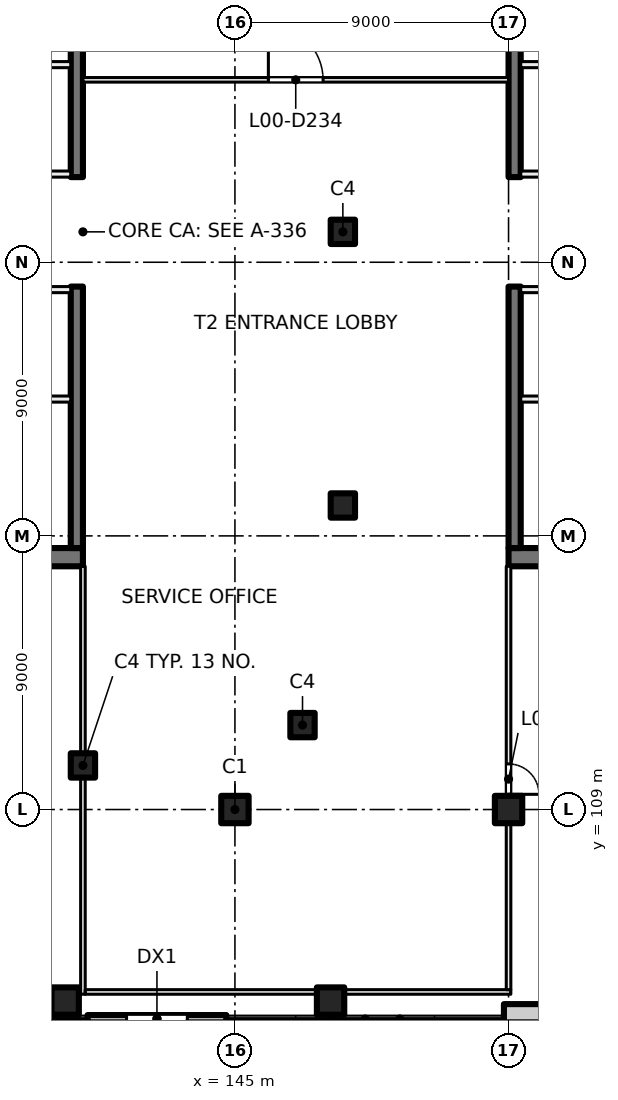
"""IFC4 building model, lengths in metres.
Left out: names, types, materials, properties, quantities, classifications, styles, units other than length and angle.
Written with IfcOpenShell. Run it as: python <this file> out.ifc"""

import sys

from ifc_helpers import new_model, si_unit, direction, frame, frame_2d, origin, origin_2d, place, context, subcontext, project, spatial, rectangle, extrude, element, fill, save


model = new_model("IFC4")
c1 = context("Model", 3, precision=1e-05, world=origin(), true_north=direction((0.0, 1.0)))
c2 = subcontext(c1, "Body", "Model", "MODEL_VIEW")
j1 = project(units=[si_unit("LENGTHUNIT", "METRE"), si_unit("PLANEANGLEUNIT", "RADIAN")], contexts=[c1])
p1 = place(None, origin())
s1 = spatial("IfcSite", under=j1, at=p1, CompositionType="ELEMENT")
p2 = place(p1, origin())
s2 = spatial("IfcBuilding", under=s1, at=p2, CompositionType="ELEMENT")
p3 = place(p2, origin())
s3 = spatial("IfcBuildingStorey", under=s2, at=p3, CompositionType="ELEMENT", Elevation=0.0)
for number, where, z_axis, x_axis in (
    (1, (145.0, 109.0, 0.0), (0.0, 0.0, 1.0), (1.0, 0.0, 0.0)),
    (2, (154.0, 109.0, 0.0), (0.0, 0.0, 1.0), (1.0, 0.0, 0.0)),
    (3, (148.146, 102.7, 0.0), (0.0, 0.0, 1.0), (1.0, 0.0, 0.0)),
    (4, (139.416, 102.7, 0.0), (0.0, 0.0, 1.0), (1.0, 0.0, 0.0)),
):
    element("IfcColumn", number, at=place(p3, frame(where, z_axis=z_axis, x_axis=x_axis)), inside=s3, PredefinedType="COLUMN", context=c2, shape_type="SweptSolid", body=[
        extrude(rectangle(XDim=0.9, YDim=0.9, at=origin_2d()), origin(), (0.0, 0.0, 1.0), 7.5),
    ])
for number, where, z_axis, x_axis in (
    (5, (148.55, 119.0, 0.0), (0.0, 0.0, 1.0), (1.0, 0.0, 0.0)),
    (6, (148.55, 128.0, 0.0), (0.0, 0.0, 1.0), (1.0, 0.0, 0.0)),
    (7, (140.0, 110.45, 0.0), (0.0, 0.0, 1.0), (1.0, 0.0, 0.0)),
    (8, (147.223, 111.777, 0.0), (0.0, 0.0, 1.0), (1.0, 0.0, 0.0)),
):
    element("IfcColumn", number, at=place(p3, frame(where, z_axis=z_axis, x_axis=x_axis)), inside=s3, PredefinedType="COLUMN", context=c2, shape_type="SweptSolid", body=[
        extrude(rectangle(XDim=0.8, YDim=0.8, at=origin_2d()), origin(), (0.0, 0.0, 1.0), 7.5),
    ])
p4 = place(p3, frame((135.4, 117.3, 0.0), z_axis=(0.0, 0.0, 1.0), x_axis=(1.0, 0.0, 0.0)))
e9 = element("IfcWall", 9, at=p4, inside=s3, PredefinedType="SHEAR", context=c2, shape_type="SweptSolid", body=[
    extrude(rectangle(XDim=4.6, YDim=0.6, at=frame_2d((2.3, 0.0))), origin(), (0.0, 0.0, 1.0), 7.5),
])
for number, where, z_axis, x_axis in (
    (10, (139.8, 117.6, 0.0), (0.0, 0.0, 1.0), (0.0, 1.0, 0.0)),
    (11, (139.8, 129.8, 0.0), (0.0, 0.0, 1.0), (0.0, 1.0, 0.0)),
):
    element("IfcWall", number, at=place(p3, frame(where, z_axis=z_axis, x_axis=x_axis)), inside=s3, PredefinedType="SHEAR", context=c2, shape_type="SweptSolid", body=[
        extrude(rectangle(XDim=8.6, YDim=0.4, at=frame_2d((4.3, 0.0))), origin(), (0.0, 0.0, 1.0), 7.5),
    ])
p5 = place(p3, frame((158.6, 117.3, 0.0), z_axis=(0.0, 0.0, 1.0), x_axis=(-1.0, 0.0, 0.0)))
e12 = element("IfcWall", 12, at=p5, inside=s3, PredefinedType="SHEAR", context=c2, shape_type="SweptSolid", body=[
    extrude(rectangle(XDim=4.6, YDim=0.6, at=frame_2d((2.3, 0.0))), origin(), (0.0, 0.0, 1.0), 7.5),
])
for number, where, z_axis, x_axis in (
    (13, (154.2, 138.4, 0.0), (0.0, 0.0, 1.0), (0.0, -1.0, 0.0)),
    (14, (154.2, 126.2, 0.0), (0.0, 0.0, 1.0), (0.0, -1.0, 0.0)),
):
    element("IfcWall", number, at=place(p3, frame(where, z_axis=z_axis, x_axis=x_axis)), inside=s3, PredefinedType="SHEAR", context=c2, shape_type="SweptSolid", body=[
        extrude(rectangle(XDim=8.6, YDim=0.4, at=frame_2d((4.3, 0.0))), origin(), (0.0, 0.0, 1.0), 7.5),
    ])
p6 = place(p3, frame((162.978, 102.3, 0.0), z_axis=(0.0, 0.0, 1.0), x_axis=(-1.0, 0.0, 0.0)))
e15 = element("IfcWall", 15, at=p6, inside=s3, PredefinedType="SOLIDWALL", context=c2, shape_type="SweptSolid", body=[
    extrude(rectangle(XDim=9.13, YDim=0.6, at=frame_2d((4.565, 0.0))), origin(), (0.0, 0.0, 1.0), 7.1),
])
p7 = place(p6, frame((1.683, 0.0, 0.0)))
e16 = element("IfcOpeningElement", 16, at=p7, cuts=e15, PredefinedType="OPENING", context=c2, shape_type="SweptSolid", body=[
    extrude(rectangle(XDim=1.2, YDim=2.4, at=frame_2d((0.6, 1.2))), frame((0.0, 0.31, 0.0), z_axis=(0.0, -1.0, 0.0), x_axis=(1.0, 0.0, 0.0)), (0.0, 0.0, 1.0), 0.62),
])
p8 = place(p3, frame((144.717, 102.12, 0.0), z_axis=(0.0, 0.0, 1.0), x_axis=(-1.0, 0.0, 0.0)))
e17 = element("IfcWall", 17, at=p8, inside=s3, PredefinedType="SOLIDWALL", context=c2, shape_type="SweptSolid", body=[
    extrude(rectangle(XDim=4.565, YDim=0.24, at=frame_2d((2.283, 0.0))), origin(), (0.0, 0.0, 1.0), 7.1),
])
p9 = place(p8, frame((1.283, 0.0, 0.0)))
e18 = element("IfcOpeningElement", 18, at=p9, cuts=e17, PredefinedType="OPENING", context=c2, shape_type="SweptSolid", body=[
    extrude(rectangle(XDim=2.0, YDim=2.5, at=frame_2d((1.0, 1.25))), frame((0.0, 0.13, 0.0), z_axis=(0.0, -1.0, 0.0), x_axis=(1.0, 0.0, 0.0)), (0.0, 0.0, 1.0), 0.26),
])
p10 = place(p3, frame((135.0, 129.9, 0.0), z_axis=(0.0, 0.0, 1.0), x_axis=(1.0, 0.0, 0.0)))
e19 = element("IfcWall", 19, at=p10, inside=s3, PredefinedType="PARTITIONING", context=c2, shape_type="SweptSolid", body=[
    extrude(rectangle(XDim=4.6, YDim=0.2, at=frame_2d((2.3, 0.0))), origin(), (0.0, 0.0, 1.0), 7.1),
])
p11 = place(p10, frame((1.7, 0.0, 0.0)))
e20 = element("IfcOpeningElement", 20, at=p11, cuts=e19, PredefinedType="OPENING", context=c2, shape_type="SweptSolid", body=[
    extrude(rectangle(XDim=1.2, YDim=2.1, at=frame_2d((0.6, 1.05))), frame((0.0, 0.11, 0.0), z_axis=(0.0, -1.0, 0.0), x_axis=(1.0, 0.0, 0.0)), (0.0, 0.0, 1.0), 0.22),
])
p12 = place(p3, frame((135.0, 133.5, 0.0), z_axis=(0.0, 0.0, 1.0), x_axis=(1.0, 0.0, 0.0)))
e21 = element("IfcWall", 21, at=p12, inside=s3, PredefinedType="PARTITIONING", context=c2, shape_type="SweptSolid", body=[
    extrude(rectangle(XDim=4.6, YDim=0.2, at=frame_2d((2.3, 0.0))), origin(), (0.0, 0.0, 1.0), 7.1),
])
p13 = place(p12, frame((1.75, 0.0, 0.0)))
e22 = element("IfcOpeningElement", 22, at=p13, cuts=e21, PredefinedType="OPENING", context=c2, shape_type="SweptSolid", body=[
    extrude(rectangle(XDim=1.5, YDim=2.1, at=frame_2d((0.75, 1.05))), frame((0.0, 0.11, 0.0), z_axis=(0.0, -1.0, 0.0), x_axis=(1.0, 0.0, 0.0)), (0.0, 0.0, 1.0), 0.22),
])
p14 = place(p3, frame((139.6, 126.1, 0.0), z_axis=(0.0, 0.0, 1.0), x_axis=(-1.0, 0.0, 0.0)))
e23 = element("IfcWall", 23, at=p14, inside=s3, PredefinedType="PARTITIONING", context=c2, shape_type="SweptSolid", body=[
    extrude(rectangle(XDim=4.6, YDim=0.2, at=frame_2d((2.3, 0.0))), origin(), (0.0, 0.0, 1.0), 7.1),
])
p15 = place(p14, frame((1.7, 0.0, 0.0)))
e24 = element("IfcOpeningElement", 24, at=p15, cuts=e23, PredefinedType="OPENING", context=c2, shape_type="SweptSolid", body=[
    extrude(rectangle(XDim=1.2, YDim=2.1, at=frame_2d((0.6, 1.05))), frame((0.0, 0.11, 0.0), z_axis=(0.0, -1.0, 0.0), x_axis=(1.0, 0.0, 0.0)), (0.0, 0.0, 1.0), 0.22),
])
p16 = place(p3, frame((139.6, 122.5, 0.0), z_axis=(0.0, 0.0, 1.0), x_axis=(-1.0, 0.0, 0.0)))
e25 = element("IfcWall", 25, at=p16, inside=s3, PredefinedType="PARTITIONING", context=c2, shape_type="SweptSolid", body=[
    extrude(rectangle(XDim=4.6, YDim=0.2, at=frame_2d((2.3, 0.0))), origin(), (0.0, 0.0, 1.0), 7.1),
])
p17 = place(p16, frame((1.35, 0.0, 0.0)))
e26 = element("IfcOpeningElement", 26, at=p17, cuts=e25, PredefinedType="OPENING", context=c2, shape_type="SweptSolid", body=[
    extrude(rectangle(XDim=1.5, YDim=2.1, at=frame_2d((0.75, 1.05))), frame((0.0, 0.11, 0.0), z_axis=(0.0, -1.0, 0.0), x_axis=(1.0, 0.0, 0.0)), (0.0, 0.0, 1.0), 0.22),
])
p18 = place(p3, frame((163.8, 126.1, 0.0), z_axis=(0.0, 0.0, 1.0), x_axis=(-1.0, 0.0, 0.0)))
e27 = element("IfcWall", 27, at=p18, inside=s3, PredefinedType="PARTITIONING", context=c2, shape_type="SweptSolid", body=[
    extrude(rectangle(XDim=9.4, YDim=0.2, at=frame_2d((4.7, 0.0))), origin(), (0.0, 0.0, 1.0), 7.1),
])
p19 = place(p18, frame((4.1, 0.0, 0.0)))
e28 = element("IfcOpeningElement", 28, at=p19, cuts=e27, PredefinedType="OPENING", context=c2, shape_type="SweptSolid", body=[
    extrude(rectangle(XDim=1.2, YDim=2.1, at=frame_2d((0.6, 1.05))), frame((0.0, 0.11, 0.0), z_axis=(0.0, -1.0, 0.0), x_axis=(1.0, 0.0, 0.0)), (0.0, 0.0, 1.0), 0.22),
])
p20 = place(p3, frame((163.8, 122.5, 0.0), z_axis=(0.0, 0.0, 1.0), x_axis=(-1.0, 0.0, 0.0)))
e29 = element("IfcWall", 29, at=p20, inside=s3, PredefinedType="PARTITIONING", context=c2, shape_type="SweptSolid", body=[
    extrude(rectangle(XDim=9.4, YDim=0.2, at=frame_2d((4.7, 0.0))), origin(), (0.0, 0.0, 1.0), 7.1),
])
p21 = place(p20, frame((6.55, 0.0, 0.0)))
e30 = element("IfcOpeningElement", 30, at=p21, cuts=e29, PredefinedType="OPENING", context=c2, shape_type="SweptSolid", body=[
    extrude(rectangle(XDim=1.5, YDim=2.1, at=frame_2d((0.75, 1.05))), frame((0.0, 0.11, 0.0), z_axis=(0.0, -1.0, 0.0), x_axis=(1.0, 0.0, 0.0)), (0.0, 0.0, 1.0), 0.22),
])
p22 = place(p3, frame((154.4, 129.9, 0.0), z_axis=(0.0, 0.0, 1.0), x_axis=(1.0, 0.0, 0.0)))
e31 = element("IfcWall", 31, at=p22, inside=s3, PredefinedType="PARTITIONING", context=c2, shape_type="SweptSolid", body=[
    extrude(rectangle(XDim=9.4, YDim=0.2, at=frame_2d((4.7, 0.0))), origin(), (0.0, 0.0, 1.0), 7.1),
])
p23 = place(p22, frame((4.1, 0.0, 0.0)))
e32 = element("IfcOpeningElement", 32, at=p23, cuts=e31, PredefinedType="OPENING", context=c2, shape_type="SweptSolid", body=[
    extrude(rectangle(XDim=1.2, YDim=2.1, at=frame_2d((0.6, 1.05))), frame((0.0, 0.11, 0.0), z_axis=(0.0, -1.0, 0.0), x_axis=(1.0, 0.0, 0.0)), (0.0, 0.0, 1.0), 0.22),
])
p24 = place(p3, frame((154.4, 133.5, 0.0), z_axis=(0.0, 0.0, 1.0), x_axis=(1.0, 0.0, 0.0)))
e33 = element("IfcWall", 33, at=p24, inside=s3, PredefinedType="PARTITIONING", context=c2, shape_type="SweptSolid", body=[
    extrude(rectangle(XDim=9.4, YDim=0.2, at=frame_2d((4.7, 0.0))), origin(), (0.0, 0.0, 1.0), 7.1),
])
p25 = place(p24, frame((1.35, 0.0, 0.0)))
e34 = element("IfcOpeningElement", 34, at=p25, cuts=e33, PredefinedType="OPENING", context=c2, shape_type="SweptSolid", body=[
    extrude(rectangle(XDim=1.5, YDim=2.1, at=frame_2d((0.75, 1.05))), frame((0.0, 0.11, 0.0), z_axis=(0.0, -1.0, 0.0), x_axis=(1.0, 0.0, 0.0)), (0.0, 0.0, 1.0), 0.22),
])
p26 = place(p3, frame((140.0, 102.925, 0.0), z_axis=(0.0, 0.0, 1.0), x_axis=(0.0, 1.0, 0.0)))
e35 = element("IfcWall", 35, at=p26, inside=s3, PredefinedType="PARTITIONING", context=c2, shape_type="SweptSolid", body=[
    extrude(rectangle(XDim=14.075, YDim=0.15, at=frame_2d((7.038, 0.0))), origin(), (0.0, 0.0, 1.0), 7.1),
])
p27 = place(p3, frame((140.075, 103.0, 0.0), z_axis=(0.0, 0.0, 1.0), x_axis=(1.0, 0.0, 0.0)))
e36 = element("IfcWall", 36, at=p27, inside=s3, PredefinedType="PARTITIONING", context=c2, shape_type="SweptSolid", body=[
    extrude(rectangle(XDim=14.0, YDim=0.15, at=frame_2d((7.0, 0.0))), origin(), (0.0, 0.0, 1.0), 7.1),
])
p28 = place(p3, frame((140.0, 133.0, 0.0), z_axis=(0.0, 0.0, 1.0), x_axis=(1.0, 0.0, 0.0)))
e37 = element("IfcWall", 37, at=p28, inside=s3, PredefinedType="PARTITIONING", context=c2, shape_type="SweptSolid", body=[
    extrude(rectangle(XDim=14.0, YDim=0.15, at=frame_2d((7.0, 0.0))), origin(), (0.0, 0.0, 1.0), 7.1),
])
p29 = place(p28, frame((6.1, 0.0, 0.0)))
e38 = element("IfcOpeningElement", 38, at=p29, cuts=e37, PredefinedType="OPENING", context=c2, shape_type="SweptSolid", body=[
    extrude(rectangle(XDim=1.8, YDim=2.1, at=frame_2d((0.9, 1.05))), frame((0.0, 0.085, 0.0), z_axis=(0.0, -1.0, 0.0), x_axis=(1.0, 0.0, 0.0)), (0.0, 0.0, 1.0), 0.17),
])
p30 = place(p3, frame((154.0, 117.0, 0.0), z_axis=(0.0, 0.0, 1.0), x_axis=(0.0, -1.0, 0.0)))
e39 = element("IfcWall", 39, at=p30, inside=s3, PredefinedType="PARTITIONING", context=c2, shape_type="SweptSolid", body=[
    extrude(rectangle(XDim=13.925, YDim=0.15, at=frame_2d((6.962, 0.0))), origin(), (0.0, 0.0, 1.0), 7.1),
])
p31 = place(p30, frame((6.5, 0.0, 0.0)))
e40 = element("IfcOpeningElement", 40, at=p31, cuts=e39, PredefinedType="OPENING", context=c2, shape_type="SweptSolid", body=[
    extrude(rectangle(XDim=1.0, YDim=2.1, at=frame_2d((0.5, 1.05))), frame((0.0, 0.085, 0.0), z_axis=(0.0, -1.0, 0.0), x_axis=(1.0, 0.0, 0.0)), (0.0, 0.0, 1.0), 0.17),
])
p32 = place(p9, origin())
e41 = element("IfcDoor", 41, at=p32, inside=s3, OperationType="DOUBLE_DOOR_SINGLE_SWING", PredefinedType="DOOR", context=c2, shape_type="SweptSolid", body=[
    extrude(rectangle(XDim=2.0, YDim=2.5, at=frame_2d((1.0, 1.25))), frame((0.0, 0.025, 0.0), z_axis=(0.0, -1.0, 0.0), x_axis=(1.0, 0.0, 0.0)), (0.0, 0.0, 1.0), 0.05),
])
fill(e18, e41)
p33 = place(p29, origin())
e42 = element("IfcDoor", 42, at=p33, inside=s3, OperationType="DOUBLE_DOOR_SINGLE_SWING", PredefinedType="DOOR", context=c2, shape_type="SweptSolid", body=[
    extrude(rectangle(XDim=1.8, YDim=2.1, at=frame_2d((0.9, 1.05))), frame((0.0, 0.025, 0.0), z_axis=(0.0, -1.0, 0.0), x_axis=(1.0, 0.0, 0.0)), (0.0, 0.0, 1.0), 0.05),
])
fill(e38, e42)
p34 = place(p31, origin())
e43 = element("IfcDoor", 43, at=p34, inside=s3, OperationType="SINGLE_SWING_RIGHT", PredefinedType="DOOR", context=c2, shape_type="SweptSolid", body=[
    extrude(rectangle(XDim=1.0, YDim=2.1, at=frame_2d((0.5, 1.05))), frame((0.0, 0.025, 0.0), z_axis=(0.0, -1.0, 0.0), x_axis=(1.0, 0.0, 0.0)), (0.0, 0.0, 1.0), 0.05),
])
fill(e40, e43)
save(model, sys.argv[1])
